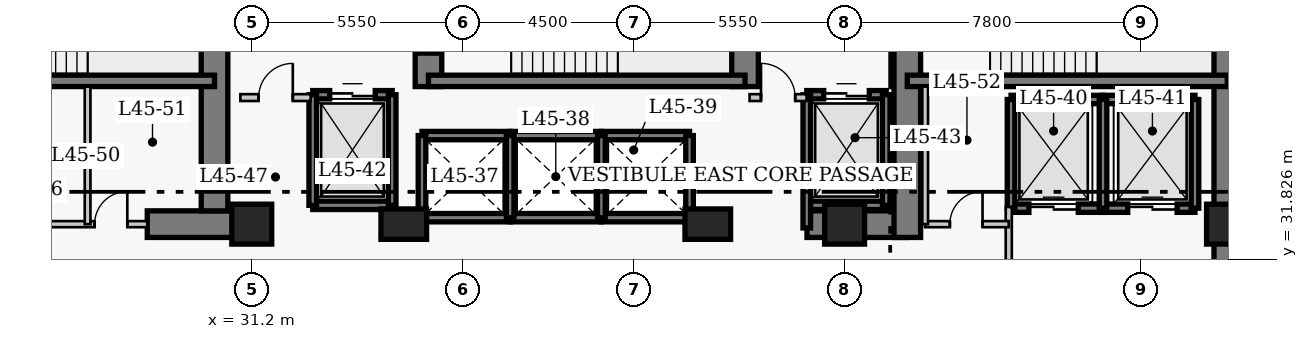
"""IFC4 building model, lengths in metres.
Left out: names, types, materials, properties, quantities, classifications, styles, units other than length and angle.
Written with IfcOpenShell. Run it as: python <this file> out.ifc"""

import sys

from ifc_helpers import new_model, si_unit, direction, frame, frame_2d, origin, origin_2d, place, context, subcontext, project, spatial, rectangle, extrude, element, fill, save


model = new_model("IFC4")
c1 = context("Model", 3, precision=1e-05, world=origin(), true_north=direction((0.0, 1.0)))
c2 = subcontext(c1, "Body", "Model", "MODEL_VIEW")
j1 = project(units=[si_unit("LENGTHUNIT", "METRE"), si_unit("PLANEANGLEUNIT", "RADIAN")], contexts=[c1])
p1 = place(None, origin())
s1 = spatial("IfcSite", under=j1, at=p1, CompositionType="ELEMENT")
p2 = place(p1, origin())
s2 = spatial("IfcBuilding", under=s1, at=p2, CompositionType="ELEMENT")
p3 = place(p2, frame((0.0, 0.0, 180.2)))
s3 = spatial("IfcBuildingStorey", under=s2, at=p3, CompositionType="ELEMENT", Elevation=180.2)
p4 = place(p3, frame((56.87, 27.05, 0.0), z_axis=(0.0, 0.0, 1.0), x_axis=(0.0, 1.0, 0.0)))
e1 = element("IfcWall", 1, at=p4, inside=s3, PredefinedType="SHEAR", context=c2, shape_type="SweptSolid", body=[
    extrude(rectangle(XDim=13.62, YDim=0.7, at=frame_2d((6.81, 0.0))), origin(), (0.0, 0.0, 1.0), 3.8),
])
p5 = place(p3, frame((28.45, 32.75, 0.0), z_axis=(0.0, 0.0, 1.0), x_axis=(1.0, 0.0, 0.0)))
e2 = element("IfcWall", 2, at=p5, inside=s3, PredefinedType="SHEAR", context=c2, shape_type="SweptSolid", body=[
    extrude(rectangle(XDim=2.4, YDim=0.7, at=frame_2d((1.2, 0.0))), origin(), (0.0, 0.0, 1.0), 3.8),
])
p6 = place(p3, frame((45.81, 32.75, 0.0), z_axis=(0.0, 0.0, 1.0), x_axis=(1.0, 0.0, 0.0)))
e3 = element("IfcWall", 3, at=p6, inside=s3, PredefinedType="SHEAR", context=c2, shape_type="SweptSolid", body=[
    extrude(rectangle(XDim=2.64, YDim=0.7, at=frame_2d((1.32, 0.0))), origin(), (0.0, 0.0, 1.0), 3.8),
])
p7 = place(p3, frame((30.22, 33.1, 0.0), z_axis=(0.0, 0.0, 1.0), x_axis=(0.0, 1.0, 0.0)))
e4 = element("IfcWall", 4, at=p7, inside=s3, PredefinedType="SHEAR", context=c2, shape_type="SweptSolid", body=[
    extrude(rectangle(XDim=7.22, YDim=0.7, at=frame_2d((3.61, 0.0))), origin(), (0.0, 0.0, 1.0), 3.8),
])
p8 = place(p3, frame((35.85, 36.37, 0.0), z_axis=(0.0, 0.0, 1.0), x_axis=(0.0, 1.0, 0.0)))
e5 = element("IfcWall", 5, at=p8, inside=s3, PredefinedType="SHEAR", context=c2, shape_type="SweptSolid", body=[
    extrude(rectangle(XDim=3.95, YDim=0.7, at=frame_2d((1.975, 0.0))), origin(), (0.0, 0.0, 1.0), 3.8),
])
p9 = place(p8, frame((0.88, 0.0, 0.0)))
e6 = element("IfcOpeningElement", 6, at=p9, cuts=e5, PredefinedType="OPENING", context=c2, shape_type="SweptSolid", body=[
    extrude(rectangle(XDim=1.1, YDim=2.15, at=frame_2d((0.55, 1.075))), frame((0.0, 0.36, 0.0), z_axis=(0.0, -1.0, 0.0), x_axis=(1.0, 0.0, 0.0)), (0.0, 0.0, 1.0), 0.72),
])
p10 = place(p3, frame((44.18, 36.37, 0.0), z_axis=(0.0, 0.0, 1.0), x_axis=(0.0, 1.0, 0.0)))
e7 = element("IfcWall", 7, at=p10, inside=s3, PredefinedType="SHEAR", context=c2, shape_type="SweptSolid", body=[
    extrude(rectangle(XDim=3.95, YDim=0.7, at=frame_2d((1.975, 0.0))), origin(), (0.0, 0.0, 1.0), 3.8),
])
p11 = place(p3, frame((48.45, 32.4, 0.0), z_axis=(0.0, 0.0, 1.0), x_axis=(0.0, 1.0, 0.0)))
e8 = element("IfcWall", 8, at=p11, inside=s3, PredefinedType="SHEAR", context=c2, shape_type="SweptSolid", body=[
    extrude(rectangle(XDim=7.92, YDim=0.7, at=frame_2d((3.96, 0.0))), origin(), (0.0, 0.0, 1.0), 3.8),
])
p12 = place(p11, frame((5.8, 0.0, 0.0)))
e9 = element("IfcOpeningElement", 9, at=p12, cuts=e8, PredefinedType="OPENING", context=c2, shape_type="SweptSolid", body=[
    extrude(rectangle(XDim=1.1, YDim=2.15, at=frame_2d((0.55, 1.075))), frame((0.0, 0.36, 0.0), z_axis=(0.0, -1.0, 0.0), x_axis=(1.0, 0.0, 0.0)), (0.0, 0.0, 1.0), 0.72),
])
p13 = place(p3, frame((21.9, 36.52, 0.0), z_axis=(0.0, 0.0, 1.0), x_axis=(1.0, 0.0, 0.0)))
e10 = element("IfcWall", 10, at=p13, inside=s3, PredefinedType="SHEAR", context=c2, shape_type="SweptSolid", body=[
    extrude(rectangle(XDim=8.32, YDim=0.3, at=frame_2d((4.16, 0.0))), origin(), (0.0, 0.0, 1.0), 3.8),
])
p14 = place(p13, frame((0.9, 0.0, 0.0)))
e11 = element("IfcOpeningElement", 11, at=p14, cuts=e10, PredefinedType="OPENING", context=c2, shape_type="SweptSolid", body=[
    extrude(rectangle(XDim=1.1, YDim=2.15, at=frame_2d((0.55, 1.075))), frame((0.0, 0.16, 0.0), z_axis=(0.0, -1.0, 0.0), x_axis=(1.0, 0.0, 0.0)), (0.0, 0.0, 1.0), 0.32),
])
p15 = place(p3, frame((35.85, 36.52, 0.0), z_axis=(0.0, 0.0, 1.0), x_axis=(1.0, 0.0, 0.0)))
e12 = element("IfcWall", 12, at=p15, inside=s3, PredefinedType="SHEAR", context=c2, shape_type="SweptSolid", body=[
    extrude(rectangle(XDim=8.33, YDim=0.3, at=frame_2d((4.165, 0.0))), origin(), (0.0, 0.0, 1.0), 3.8),
])
p16 = place(p3, frame((48.45, 36.52, 0.0), z_axis=(0.0, 0.0, 1.0), x_axis=(1.0, 0.0, 0.0)))
e13 = element("IfcWall", 13, at=p16, inside=s3, PredefinedType="SHEAR", context=c2, shape_type="SweptSolid", body=[
    extrude(rectangle(XDim=8.42, YDim=0.3, at=frame_2d((4.21, 0.0))), origin(), (0.0, 0.0, 1.0), 3.8),
])
p17 = place(p3, frame((31.2, 32.75, 0.0), z_axis=(0.0, 0.0, 1.0), x_axis=(1.0, 0.0, 0.0)))
e14 = element("IfcColumn", 14, at=p17, inside=s3, PredefinedType="COLUMN", context=c2, shape_type="SweptSolid", body=[
    extrude(rectangle(XDim=1.05, YDim=1.05, at=origin_2d()), origin(), (0.0, 0.0, 1.0), 3.8),
])
for number, where, z_axis, x_axis in (
    (15, (35.2, 32.75, 0.0), (0.0, 0.0, 1.0), (1.0, 0.0, 0.0)),
    (16, (43.2, 32.75, 0.0), (0.0, 0.0, 1.0), (1.0, 0.0, 0.0)),
):
    element("IfcColumn", number, at=place(p3, frame(where, z_axis=z_axis, x_axis=x_axis)), inside=s3, PredefinedType="COLUMN", context=c2, shape_type="SweptSolid", body=[
        extrude(rectangle(XDim=1.2, YDim=0.8, at=origin_2d()), origin(), (0.0, 0.0, 1.0), 3.8),
    ])
for number, where, z_axis, x_axis in (
    (17, (46.8, 32.75, 0.0), (0.0, 0.0, 1.0), (1.0, 0.0, 0.0)),
    (18, (56.85, 32.75, 0.0), (0.0, 0.0, 1.0), (1.0, 0.0, 0.0)),
):
    element("IfcColumn", number, at=place(p3, frame(where, z_axis=z_axis, x_axis=x_axis)), inside=s3, PredefinedType="COLUMN", context=c2, shape_type="SweptSolid", body=[
        extrude(rectangle(XDim=1.05, YDim=1.05, at=origin_2d()), origin(), (0.0, 0.0, 1.0), 3.8),
    ])
for number, where, z_axis, x_axis in (
    (19, (35.68, 35.08, 0.0), (0.0, 0.0, 1.0), (1.0, 0.0, 0.0)),
    (20, (35.68, 32.92, 0.0), (0.0, 0.0, 1.0), (1.0, 0.0, 0.0)),
):
    element("IfcWall", number, at=place(p3, frame(where, z_axis=z_axis, x_axis=x_axis)), inside=s3, PredefinedType="SHEAR", context=c2, shape_type="SweptSolid", body=[
        extrude(rectangle(XDim=2.32, YDim=0.22, at=frame_2d((1.16, 0.0))), origin(), (0.0, 0.0, 1.0), 3.8),
    ])
p18 = place(p3, frame((35.68, 32.92, 0.0), z_axis=(0.0, 0.0, 1.0), x_axis=(0.0, 1.0, 0.0)))
e21 = element("IfcWall", 21, at=p18, inside=s3, PredefinedType="SHEAR", context=c2, shape_type="SweptSolid", body=[
    extrude(rectangle(XDim=2.16, YDim=0.2, at=frame_2d((1.08, 0.0))), origin(), (0.0, 0.0, 1.0), 3.8),
])
for number, where, z_axis, x_axis in (
    (22, (38.0, 35.08, 0.0), (0.0, 0.0, 1.0), (1.0, 0.0, 0.0)),
    (23, (38.0, 32.92, 0.0), (0.0, 0.0, 1.0), (1.0, 0.0, 0.0)),
):
    element("IfcWall", number, at=place(p3, frame(where, z_axis=z_axis, x_axis=x_axis)), inside=s3, PredefinedType="SHEAR", context=c2, shape_type="SweptSolid", body=[
        extrude(rectangle(XDim=2.4, YDim=0.22, at=frame_2d((1.2, 0.0))), origin(), (0.0, 0.0, 1.0), 3.8),
    ])
p19 = place(p3, frame((38.0, 32.92, 0.0), z_axis=(0.0, 0.0, 1.0), x_axis=(0.0, 1.0, 0.0)))
e24 = element("IfcWall", 24, at=p19, inside=s3, PredefinedType="SHEAR", context=c2, shape_type="SweptSolid", body=[
    extrude(rectangle(XDim=2.16, YDim=0.2, at=frame_2d((1.08, 0.0))), origin(), (0.0, 0.0, 1.0), 3.8),
])
for number, where, z_axis, x_axis in (
    (25, (40.4, 35.08, 0.0), (0.0, 0.0, 1.0), (1.0, 0.0, 0.0)),
    (26, (40.4, 32.92, 0.0), (0.0, 0.0, 1.0), (1.0, 0.0, 0.0)),
):
    element("IfcWall", number, at=place(p3, frame(where, z_axis=z_axis, x_axis=x_axis)), inside=s3, PredefinedType="SHEAR", context=c2, shape_type="SweptSolid", body=[
        extrude(rectangle(XDim=2.32, YDim=0.22, at=frame_2d((1.16, 0.0))), origin(), (0.0, 0.0, 1.0), 3.8),
    ])
for number, where, z_axis, x_axis in (
    (27, (40.4, 32.92, 0.0), (0.0, 0.0, 1.0), (0.0, 1.0, 0.0)),
    (28, (42.72, 32.92, 0.0), (0.0, 0.0, 1.0), (0.0, 1.0, 0.0)),
):
    element("IfcWall", number, at=place(p3, frame(where, z_axis=z_axis, x_axis=x_axis)), inside=s3, PredefinedType="SHEAR", context=c2, shape_type="SweptSolid", body=[
        extrude(rectangle(XDim=2.16, YDim=0.2, at=frame_2d((1.08, 0.0))), origin(), (0.0, 0.0, 1.0), 3.8),
    ])
p20 = place(p3, frame((51.18, 36.03, 0.0), z_axis=(0.0, 0.0, 1.0), x_axis=(1.0, 0.0, 0.0)))
e29 = element("IfcWall", 29, at=p20, inside=s3, PredefinedType="SHEAR", context=c2, shape_type="SweptSolid", body=[
    extrude(rectangle(XDim=2.42, YDim=0.22, at=frame_2d((1.21, 0.0))), origin(), (0.0, 0.0, 1.0), 3.8),
])
p21 = place(p3, frame((51.18, 33.17, 0.0), z_axis=(0.0, 0.0, 1.0), x_axis=(1.0, 0.0, 0.0)))
e30 = element("IfcWall", 30, at=p21, inside=s3, PredefinedType="SHEAR", context=c2, shape_type="SweptSolid", body=[
    extrude(rectangle(XDim=2.42, YDim=0.22, at=frame_2d((1.21, 0.0))), origin(), (0.0, 0.0, 1.0), 3.8),
])
p22 = place(p21, frame((0.47, 0.0, 0.0)))
e31 = element("IfcOpeningElement", 31, at=p22, cuts=e30, PredefinedType="OPENING", context=c2, shape_type="SweptSolid", body=[
    extrude(rectangle(XDim=1.3, YDim=2.15, at=frame_2d((0.65, 1.075))), frame((0.0, 0.12, 0.0), z_axis=(0.0, -1.0, 0.0), x_axis=(1.0, 0.0, 0.0)), (0.0, 0.0, 1.0), 0.24),
])
p23 = place(p3, frame((51.18, 33.17, 0.0), z_axis=(0.0, 0.0, 1.0), x_axis=(0.0, 1.0, 0.0)))
e32 = element("IfcWall", 32, at=p23, inside=s3, PredefinedType="SHEAR", context=c2, shape_type="SweptSolid", body=[
    extrude(rectangle(XDim=2.86, YDim=0.2, at=frame_2d((1.43, 0.0))), origin(), (0.0, 0.0, 1.0), 3.8),
])
p24 = place(p3, frame((53.6, 36.03, 0.0), z_axis=(0.0, 0.0, 1.0), x_axis=(1.0, 0.0, 0.0)))
e33 = element("IfcWall", 33, at=p24, inside=s3, PredefinedType="SHEAR", context=c2, shape_type="SweptSolid", body=[
    extrude(rectangle(XDim=2.42, YDim=0.22, at=frame_2d((1.21, 0.0))), origin(), (0.0, 0.0, 1.0), 3.8),
])
p25 = place(p3, frame((53.6, 33.17, 0.0), z_axis=(0.0, 0.0, 1.0), x_axis=(1.0, 0.0, 0.0)))
e34 = element("IfcWall", 34, at=p25, inside=s3, PredefinedType="SHEAR", context=c2, shape_type="SweptSolid", body=[
    extrude(rectangle(XDim=2.42, YDim=0.22, at=frame_2d((1.21, 0.0))), origin(), (0.0, 0.0, 1.0), 3.8),
])
p26 = place(p25, frame((0.65, 0.0, 0.0)))
e35 = element("IfcOpeningElement", 35, at=p26, cuts=e34, PredefinedType="OPENING", context=c2, shape_type="SweptSolid", body=[
    extrude(rectangle(XDim=1.3, YDim=2.15, at=frame_2d((0.65, 1.075))), frame((0.0, 0.12, 0.0), z_axis=(0.0, -1.0, 0.0), x_axis=(1.0, 0.0, 0.0)), (0.0, 0.0, 1.0), 0.24),
])
for number, where, z_axis, x_axis in (
    (36, (53.6, 33.17, 0.0), (0.0, 0.0, 1.0), (0.0, 1.0, 0.0)),
    (37, (56.02, 33.17, 0.0), (0.0, 0.0, 1.0), (0.0, 1.0, 0.0)),
):
    element("IfcWall", number, at=place(p3, frame(where, z_axis=z_axis, x_axis=x_axis)), inside=s3, PredefinedType="SHEAR", context=c2, shape_type="SweptSolid", body=[
        extrude(rectangle(XDim=2.86, YDim=0.2, at=frame_2d((1.43, 0.0))), origin(), (0.0, 0.0, 1.0), 3.8),
    ])
p27 = place(p3, frame((32.805, 36.155, 0.0), z_axis=(0.0, 0.0, 1.0), x_axis=(1.0, 0.0, 0.0)))
e38 = element("IfcWall", 38, at=p27, inside=s3, PredefinedType="SHEAR", context=c2, shape_type="SweptSolid", body=[
    extrude(rectangle(XDim=2.09, YDim=0.22, at=frame_2d((1.045, 0.0))), origin(), (0.0, 0.0, 1.0), 3.8),
])
p28 = place(p27, frame((0.445, 0.0, 0.0)))
e39 = element("IfcOpeningElement", 39, at=p28, cuts=e38, PredefinedType="OPENING", context=c2, shape_type="SweptSolid", body=[
    extrude(rectangle(XDim=1.2, YDim=2.15, at=frame_2d((0.6, 1.075))), frame((0.0, 0.12, 0.0), z_axis=(0.0, -1.0, 0.0), x_axis=(1.0, 0.0, 0.0)), (0.0, 0.0, 1.0), 0.24),
])
p29 = place(p3, frame((32.805, 33.245, 0.0), z_axis=(0.0, 0.0, 1.0), x_axis=(1.0, 0.0, 0.0)))
e40 = element("IfcWall", 40, at=p29, inside=s3, PredefinedType="SHEAR", context=c2, shape_type="SweptSolid", body=[
    extrude(rectangle(XDim=2.09, YDim=0.22, at=frame_2d((1.045, 0.0))), origin(), (0.0, 0.0, 1.0), 3.8),
])
for number, where, z_axis, x_axis in (
    (41, (32.805, 33.245, 0.0), (0.0, 0.0, 1.0), (0.0, 1.0, 0.0)),
    (42, (34.895, 33.245, 0.0), (0.0, 0.0, 1.0), (0.0, 1.0, 0.0)),
):
    element("IfcWall", number, at=place(p3, frame(where, z_axis=z_axis, x_axis=x_axis)), inside=s3, PredefinedType="SHEAR", context=c2, shape_type="SweptSolid", body=[
        extrude(rectangle(XDim=2.91, YDim=0.2, at=frame_2d((1.455, 0.0))), origin(), (0.0, 0.0, 1.0), 3.8),
    ])
p30 = place(p3, frame((45.805, 36.155, 0.0), z_axis=(0.0, 0.0, 1.0), x_axis=(1.0, 0.0, 0.0)))
e43 = element("IfcWall", 43, at=p30, inside=s3, PredefinedType="SHEAR", context=c2, shape_type="SweptSolid", body=[
    extrude(rectangle(XDim=2.09, YDim=0.22, at=frame_2d((1.045, 0.0))), origin(), (0.0, 0.0, 1.0), 3.8),
])
p31 = place(p30, frame((0.445, 0.0, 0.0)))
e44 = element("IfcOpeningElement", 44, at=p31, cuts=e43, PredefinedType="OPENING", context=c2, shape_type="SweptSolid", body=[
    extrude(rectangle(XDim=1.2, YDim=2.15, at=frame_2d((0.6, 1.075))), frame((0.0, 0.12, 0.0), z_axis=(0.0, -1.0, 0.0), x_axis=(1.0, 0.0, 0.0)), (0.0, 0.0, 1.0), 0.24),
])
p32 = place(p3, frame((45.805, 33.245, 0.0), z_axis=(0.0, 0.0, 1.0), x_axis=(1.0, 0.0, 0.0)))
e45 = element("IfcWall", 45, at=p32, inside=s3, PredefinedType="SHEAR", context=c2, shape_type="SweptSolid", body=[
    extrude(rectangle(XDim=2.09, YDim=0.22, at=frame_2d((1.045, 0.0))), origin(), (0.0, 0.0, 1.0), 3.8),
])
p33 = place(p3, frame((45.805, 32.65, 0.0), z_axis=(0.0, 0.0, 1.0), x_axis=(0.0, 1.0, 0.0)))
e46 = element("IfcWall", 46, at=p33, inside=s3, PredefinedType="SHEAR", context=c2, shape_type="SweptSolid", body=[
    extrude(rectangle(XDim=3.505, YDim=0.2, at=frame_2d((1.752, 0.0))), origin(), (0.0, 0.0, 1.0), 3.8),
])
p34 = place(p3, frame((47.895, 33.245, 0.0), z_axis=(0.0, 0.0, 1.0), x_axis=(0.0, 1.0, 0.0)))
e47 = element("IfcWall", 47, at=p34, inside=s3, PredefinedType="SHEAR", context=c2, shape_type="SweptSolid", body=[
    extrude(rectangle(XDim=2.91, YDim=0.2, at=frame_2d((1.455, 0.0))), origin(), (0.0, 0.0, 1.0), 3.8),
])
p35 = place(p3, frame((30.9, 36.08, 0.0), z_axis=(0.0, 0.0, 1.0), x_axis=(1.0, 0.0, 0.0)))
e48 = element("IfcWall", 48, at=p35, inside=s3, PredefinedType="PARTITIONING", context=c2, shape_type="SweptSolid", body=[
    extrude(rectangle(XDim=1.85, YDim=0.18, at=frame_2d((0.925, 0.0))), origin(), (0.0, 0.0, 1.0), 3.42),
])
p36 = place(p35, frame((0.48, 0.0, 0.0)))
e49 = element("IfcOpeningElement", 49, at=p36, cuts=e48, PredefinedType="OPENING", context=c2, shape_type="SweptSolid", body=[
    extrude(rectangle(XDim=0.9, YDim=2.15, at=frame_2d((0.45, 1.075))), frame((0.0, 0.1, 0.0), z_axis=(0.0, -1.0, 0.0), x_axis=(1.0, 0.0, 0.0)), (0.0, 0.0, 1.0), 0.2),
])
p37 = place(p3, frame((44.3, 36.08, 0.0), z_axis=(0.0, 0.0, 1.0), x_axis=(1.0, 0.0, 0.0)))
e50 = element("IfcWall", 50, at=p37, inside=s3, PredefinedType="PARTITIONING", context=c2, shape_type="SweptSolid", body=[
    extrude(rectangle(XDim=1.5, YDim=0.18, at=frame_2d((0.75, 0.0))), origin(), (0.0, 0.0, 1.0), 3.42),
])
p38 = place(p37, frame((0.3, 0.0, 0.0)))
e51 = element("IfcOpeningElement", 51, at=p38, cuts=e50, PredefinedType="OPENING", context=c2, shape_type="SweptSolid", body=[
    extrude(rectangle(XDim=0.9, YDim=2.15, at=frame_2d((0.45, 1.075))), frame((0.0, 0.1, 0.0), z_axis=(0.0, -1.0, 0.0), x_axis=(1.0, 0.0, 0.0)), (0.0, 0.0, 1.0), 0.2),
])
p39 = place(p3, frame((51.12, 29.5, 0.0), z_axis=(0.0, 0.0, 1.0), x_axis=(0.0, 1.0, 0.0)))
e52 = element("IfcWall", 52, at=p39, inside=s3, PredefinedType="PARTITIONING", context=c2, shape_type="SweptSolid", body=[
    extrude(rectangle(XDim=3.7, YDim=0.16, at=frame_2d((1.85, 0.0))), origin(), (0.0, 0.0, 1.0), 3.42),
])
p40 = place(p39, frame((0.9, 0.0, 0.0)))
e53 = element("IfcOpeningElement", 53, at=p40, cuts=e52, PredefinedType="OPENING", context=c2, shape_type="SweptSolid", body=[
    extrude(rectangle(XDim=1.1, YDim=2.15, at=frame_2d((0.55, 1.075))), frame((0.0, 0.09, 0.0), z_axis=(0.0, -1.0, 0.0), x_axis=(1.0, 0.0, 0.0)), (0.0, 0.0, 1.0), 0.18),
])
p41 = place(p3, frame((24.48, 32.75, 0.0), z_axis=(0.0, 0.0, 1.0), x_axis=(1.0, 0.0, 0.0)))
e54 = element("IfcWall", 54, at=p41, inside=s3, PredefinedType="PARTITIONING", context=c2, shape_type="SweptSolid", body=[
    extrude(rectangle(XDim=3.97, YDim=0.16, at=frame_2d((1.985, 0.0))), origin(), (0.0, 0.0, 1.0), 3.42),
])
p42 = place(p41, frame((2.585, 0.0, 0.0)))
e55 = element("IfcOpeningElement", 55, at=p42, cuts=e54, PredefinedType="OPENING", context=c2, shape_type="SweptSolid", body=[
    extrude(rectangle(XDim=0.86, YDim=2.05, at=frame_2d((0.43, 1.025))), frame((0.0, 0.09, 0.0), z_axis=(0.0, -1.0, 0.0), x_axis=(1.0, 0.0, 0.0)), (0.0, 0.0, 1.0), 0.18),
])
p43 = place(p3, frame((48.92, 32.75, 0.0), z_axis=(0.0, 0.0, 1.0), x_axis=(1.0, 0.0, 0.0)))
e56 = element("IfcWall", 56, at=p43, inside=s3, PredefinedType="PARTITIONING", context=c2, shape_type="SweptSolid", body=[
    extrude(rectangle(XDim=2.2, YDim=0.16, at=frame_2d((1.1, 0.0))), origin(), (0.0, 0.0, 1.0), 3.42),
])
p44 = place(p43, frame((0.65, 0.0, 0.0)))
e57 = element("IfcOpeningElement", 57, at=p44, cuts=e56, PredefinedType="OPENING", context=c2, shape_type="SweptSolid", body=[
    extrude(rectangle(XDim=0.86, YDim=2.05, at=frame_2d((0.43, 1.025))), frame((0.0, 0.09, 0.0), z_axis=(0.0, -1.0, 0.0), x_axis=(1.0, 0.0, 0.0)), (0.0, 0.0, 1.0), 0.18),
])
for number, where, z_axis, x_axis in (
    (58, (48.92, 32.75, 0.0), (0.0, 0.0, 1.0), (0.0, 1.0, 0.0)),
    (59, (26.88, 32.75, 0.0), (0.0, 0.0, 1.0), (0.0, 1.0, 0.0)),
):
    element("IfcWall", number, at=place(p3, frame(where, z_axis=z_axis, x_axis=x_axis)), inside=s3, PredefinedType="PARTITIONING", context=c2, shape_type="SweptSolid", body=[
        extrude(rectangle(XDim=3.62, YDim=0.15, at=frame_2d((1.81, 0.0))), origin(), (0.0, 0.0, 1.0), 3.42),
    ])
p45 = place(p22, origin())
e60 = element("IfcDoor", 60, at=p45, inside=s3, OperationType="DOUBLE_DOOR_SLIDING", PredefinedType="DOOR", context=c2, shape_type="SweptSolid", body=[
    extrude(rectangle(XDim=1.3, YDim=2.15, at=frame_2d((0.65, 1.075))), frame((0.0, 0.025, 0.0), z_axis=(0.0, -1.0, 0.0), x_axis=(1.0, 0.0, 0.0)), (0.0, 0.0, 1.0), 0.05),
])
fill(e31, e60)
p46 = place(p26, origin())
e61 = element("IfcDoor", 61, at=p46, inside=s3, OperationType="DOUBLE_DOOR_SLIDING", PredefinedType="DOOR", context=c2, shape_type="SweptSolid", body=[
    extrude(rectangle(XDim=1.3, YDim=2.15, at=frame_2d((0.65, 1.075))), frame((0.0, 0.025, 0.0), z_axis=(0.0, -1.0, 0.0), x_axis=(1.0, 0.0, 0.0)), (0.0, 0.0, 1.0), 0.05),
])
fill(e35, e61)
p47 = place(p28, origin())
e62 = element("IfcDoor", 62, at=p47, inside=s3, OperationType="DOUBLE_DOOR_SLIDING", PredefinedType="DOOR", context=c2, shape_type="SweptSolid", body=[
    extrude(rectangle(XDim=1.2, YDim=2.15, at=frame_2d((0.6, 1.075))), frame((0.0, 0.025, 0.0), z_axis=(0.0, -1.0, 0.0), x_axis=(1.0, 0.0, 0.0)), (0.0, 0.0, 1.0), 0.05),
])
fill(e39, e62)
p48 = place(p31, origin())
e63 = element("IfcDoor", 63, at=p48, inside=s3, OperationType="DOUBLE_DOOR_SLIDING", PredefinedType="DOOR", context=c2, shape_type="SweptSolid", body=[
    extrude(rectangle(XDim=1.2, YDim=2.15, at=frame_2d((0.6, 1.075))), frame((0.0, 0.025, 0.0), z_axis=(0.0, -1.0, 0.0), x_axis=(1.0, 0.0, 0.0)), (0.0, 0.0, 1.0), 0.05),
])
fill(e44, e63)
p49 = place(p36, origin())
e64 = element("IfcDoor", 64, at=p49, inside=s3, OperationType="SINGLE_SWING_RIGHT", PredefinedType="DOOR", context=c2, shape_type="SweptSolid", body=[
    extrude(rectangle(XDim=0.9, YDim=2.15, at=frame_2d((0.45, 1.075))), frame((0.0, 0.025, 0.0), z_axis=(0.0, -1.0, 0.0), x_axis=(1.0, 0.0, 0.0)), (0.0, 0.0, 1.0), 0.05),
])
fill(e49, e64)
p50 = place(p38, origin())
e65 = element("IfcDoor", 65, at=p50, inside=s3, OperationType="SINGLE_SWING_LEFT", PredefinedType="DOOR", context=c2, shape_type="SweptSolid", body=[
    extrude(rectangle(XDim=0.9, YDim=2.15, at=frame_2d((0.45, 1.075))), frame((0.0, 0.025, 0.0), z_axis=(0.0, -1.0, 0.0), x_axis=(1.0, 0.0, 0.0)), (0.0, 0.0, 1.0), 0.05),
])
fill(e51, e65)
p51 = place(p42, origin())
e66 = element("IfcDoor", 66, at=p51, inside=s3, OperationType="SINGLE_SWING_RIGHT", PredefinedType="DOOR", context=c2, shape_type="SweptSolid", body=[
    extrude(rectangle(XDim=0.86, YDim=2.05, at=frame_2d((0.43, 1.025))), frame((0.0, 0.025, 0.0), z_axis=(0.0, -1.0, 0.0), x_axis=(1.0, 0.0, 0.0)), (0.0, 0.0, 1.0), 0.05),
])
fill(e55, e66)
p52 = place(p44, origin())
e67 = element("IfcDoor", 67, at=p52, inside=s3, OperationType="SINGLE_SWING_RIGHT", PredefinedType="DOOR", context=c2, shape_type="SweptSolid", body=[
    extrude(rectangle(XDim=0.86, YDim=2.05, at=frame_2d((0.43, 1.025))), frame((0.0, 0.025, 0.0), z_axis=(0.0, -1.0, 0.0), x_axis=(1.0, 0.0, 0.0)), (0.0, 0.0, 1.0), 0.05),
])
fill(e57, e67)
p53 = place(p9, origin())
e68 = element("IfcDoor", 68, at=p53, inside=s3, OperationType="SINGLE_SWING_RIGHT", PredefinedType="DOOR", context=c2, shape_type="SweptSolid", body=[
    extrude(rectangle(XDim=1.1, YDim=2.15, at=frame_2d((0.55, 1.075))), frame((0.0, 0.025, 0.0), z_axis=(0.0, -1.0, 0.0), x_axis=(1.0, 0.0, 0.0)), (0.0, 0.0, 1.0), 0.05),
])
fill(e6, e68)
save(model, sys.argv[1])
